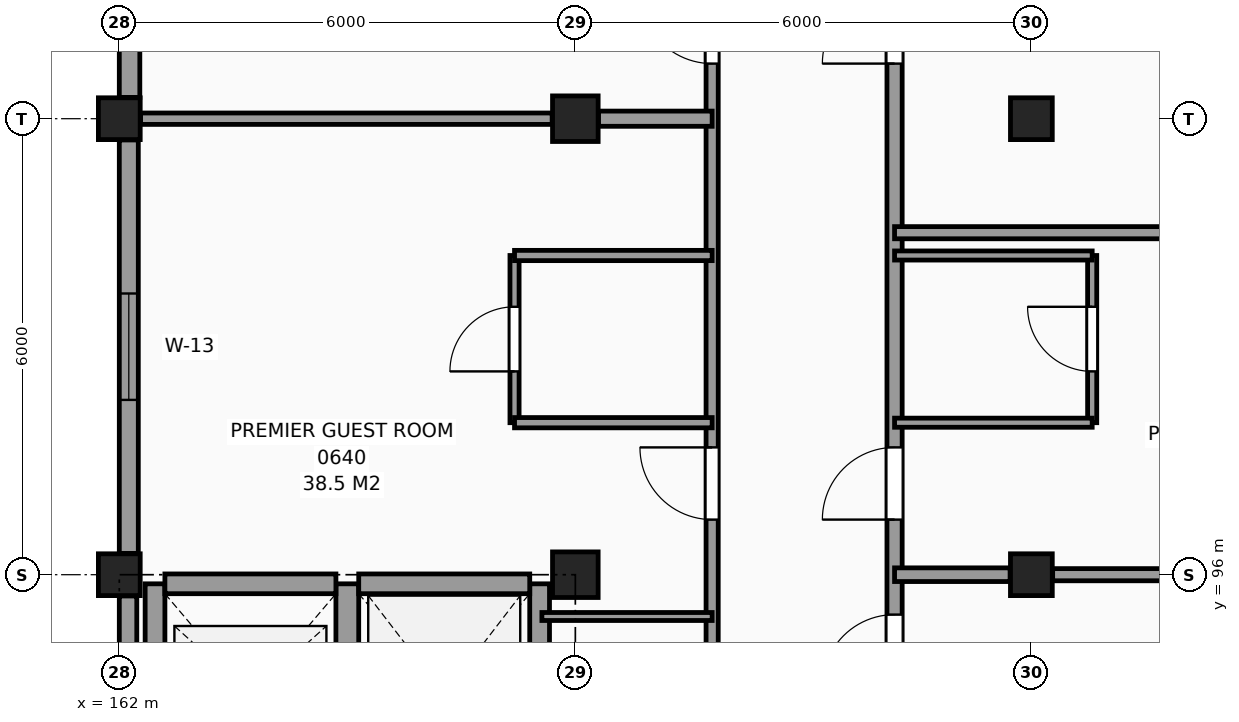
"""IFC4 building model, lengths in metres.
Left out: names, types, materials, properties, quantities, classifications, styles, units other than length and angle.
Written with IfcOpenShell. Run it as: python <this file> out.ifc"""

import sys

from ifc_helpers import new_model, si_unit, direction, frame, frame_2d, origin, origin_2d, place, context, subcontext, project, spatial, rectangle, extrude, element, fill, save


model = new_model("IFC4")
c1 = context("Model", 3, precision=1e-05, world=origin(), true_north=direction((0.0, 1.0)))
c2 = subcontext(c1, "Body", "Model", "MODEL_VIEW")
j1 = project(units=[si_unit("LENGTHUNIT", "METRE"), si_unit("PLANEANGLEUNIT", "RADIAN")], contexts=[c1])
p1 = place(None, origin())
s1 = spatial("IfcSite", under=j1, at=p1, CompositionType="ELEMENT")
p2 = place(p1, origin())
s2 = spatial("IfcBuilding", under=s1, at=p2, CompositionType="ELEMENT")
p3 = place(p2, frame((0.0, 0.0, 28.2)))
s3 = spatial("IfcBuildingStorey", under=s2, at=p3, CompositionType="ELEMENT", Elevation=28.2)
for number, where, z_axis, x_axis in (
    (1, (162.0, 96.0, 0.0), (0.0, 0.0, 1.0), (1.0, 0.0, 0.0)),
    (2, (162.0, 102.0, 0.0), (0.0, 0.0, 1.0), (1.0, 0.0, 0.0)),
):
    element("IfcColumn", number, at=place(p3, frame(where, z_axis=z_axis, x_axis=x_axis)), inside=s3, PredefinedType="COLUMN", context=c2, shape_type="SweptSolid", body=[
        extrude(rectangle(XDim=0.55, YDim=0.55, at=origin_2d()), origin(), (0.0, 0.0, 1.0), 3.3),
    ])
for number, where, z_axis, x_axis in (
    (3, (168.0, 96.0, 0.0), (0.0, 0.0, 1.0), (1.0, 0.0, 0.0)),
    (4, (168.0, 102.0, 0.0), (0.0, 0.0, 1.0), (1.0, 0.0, 0.0)),
):
    element("IfcColumn", number, at=place(p3, frame(where, z_axis=z_axis, x_axis=x_axis)), inside=s3, PredefinedType="COLUMN", context=c2, shape_type="SweptSolid", body=[
        extrude(rectangle(XDim=0.6, YDim=0.6, at=origin_2d()), origin(), (0.0, 0.0, 1.0), 3.3),
    ])
for number, where, z_axis, x_axis in (
    (5, (174.0, 96.0, 0.0), (0.0, 0.0, 1.0), (1.0, 0.0, 0.0)),
    (6, (174.0, 102.0, 0.0), (0.0, 0.0, 1.0), (1.0, 0.0, 0.0)),
):
    element("IfcColumn", number, at=place(p3, frame(where, z_axis=z_axis, x_axis=x_axis)), inside=s3, PredefinedType="COLUMN", context=c2, shape_type="SweptSolid", body=[
        extrude(rectangle(XDim=0.55, YDim=0.55, at=origin_2d()), origin(), (0.0, 0.0, 1.0), 3.3),
    ])
p4 = place(p3, frame((162.135, 107.72, 0.0), z_axis=(0.0, 0.0, 1.0), x_axis=(0.0, -1.0, 0.0)))
e7 = element("IfcWall", 7, at=p4, inside=s3, PredefinedType="SOLIDWALL", context=c2, shape_type="SweptSolid", body=[
    extrude(rectangle(XDim=5.44, YDim=0.27, at=frame_2d((2.72, 0.0))), origin(), (0.0, 0.0, 1.0), 2.43),
])
p5 = place(p4, frame((2.02, 0.0, 0.8)))
e8 = element("IfcOpeningElement", 8, at=p5, cuts=e7, PredefinedType="OPENING", context=c2, shape_type="SweptSolid", body=[
    extrude(rectangle(XDim=1.4, YDim=1.4, at=frame_2d((0.7, 0.7))), frame((0.0, 0.145, 0.0), z_axis=(0.0, -1.0, 0.0), x_axis=(1.0, 0.0, 0.0)), (0.0, 0.0, 1.0), 0.29),
])
p6 = place(p3, frame((162.125, 101.72, 0.0), z_axis=(0.0, 0.0, 1.0), x_axis=(0.0, -1.0, 0.0)))
e9 = element("IfcWall", 9, at=p6, inside=s3, PredefinedType="SOLIDWALL", context=c2, shape_type="SweptSolid", body=[
    extrude(rectangle(XDim=5.44, YDim=0.25, at=frame_2d((2.72, 0.0))), origin(), (0.0, 0.0, 1.0), 2.43),
])
p7 = place(p6, frame((2.02, 0.0, 0.8)))
e10 = element("IfcOpeningElement", 10, at=p7, cuts=e9, PredefinedType="OPENING", context=c2, shape_type="SweptSolid", body=[
    extrude(rectangle(XDim=1.4, YDim=1.4, at=frame_2d((0.7, 0.7))), frame((0.0, 0.135, 0.0), z_axis=(0.0, -1.0, 0.0), x_axis=(1.0, 0.0, 0.0)), (0.0, 0.0, 1.0), 0.27),
])
p8 = place(p3, frame((162.115, 95.72, 0.0), z_axis=(0.0, 0.0, 1.0), x_axis=(0.0, -1.0, 0.0)))
e11 = element("IfcWall", 11, at=p8, inside=s3, PredefinedType="SOLIDWALL", context=c2, shape_type="SweptSolid", body=[
    extrude(rectangle(XDim=5.44, YDim=0.23, at=frame_2d((2.72, 0.0))), origin(), (0.0, 0.0, 1.0), 2.43),
])
p9 = place(p3, frame((162.47, 92.97, 0.0), z_axis=(0.0, 0.0, 1.0), x_axis=(0.0, 1.0, 0.0)))
e12 = element("IfcWall", 12, at=p9, inside=s3, PredefinedType="SHEAR", context=c2, shape_type="SweptSolid", body=[
    extrude(rectangle(XDim=2.91, YDim=0.26, at=frame_2d((1.455, 0.0))), origin(), (0.0, 0.0, 1.0), 3.3),
])
p10 = place(p3, frame((165.0, 92.97, 0.0), z_axis=(0.0, 0.0, 1.0), x_axis=(0.0, 1.0, 0.0)))
e13 = element("IfcWall", 13, at=p10, inside=s3, PredefinedType="SHEAR", context=c2, shape_type="SweptSolid", body=[
    extrude(rectangle(XDim=2.91, YDim=0.3, at=frame_2d((1.455, 0.0))), origin(), (0.0, 0.0, 1.0), 3.3),
])
p11 = place(p3, frame((162.6, 95.88, 0.0), z_axis=(0.0, 0.0, 1.0), x_axis=(1.0, 0.0, 0.0)))
e14 = element("IfcWall", 14, at=p11, inside=s3, PredefinedType="SHEAR", context=c2, shape_type="SweptSolid", body=[
    extrude(rectangle(XDim=2.25, YDim=0.26, at=frame_2d((1.125, 0.0))), origin(), (0.0, 0.0, 1.0), 3.3),
])
p12 = place(p3, frame((167.53, 92.97, 0.0), z_axis=(0.0, 0.0, 1.0), x_axis=(0.0, 1.0, 0.0)))
e15 = element("IfcWall", 15, at=p12, inside=s3, PredefinedType="SHEAR", context=c2, shape_type="SweptSolid", body=[
    extrude(rectangle(XDim=2.91, YDim=0.26, at=frame_2d((1.455, 0.0))), origin(), (0.0, 0.0, 1.0), 3.3),
])
p13 = place(p3, frame((165.15, 95.88, 0.0), z_axis=(0.0, 0.0, 1.0), x_axis=(1.0, 0.0, 0.0)))
e16 = element("IfcWall", 16, at=p13, inside=s3, PredefinedType="SHEAR", context=c2, shape_type="SweptSolid", body=[
    extrude(rectangle(XDim=2.25, YDim=0.26, at=frame_2d((1.125, 0.0))), origin(), (0.0, 0.0, 1.0), 3.3),
])
p14 = place(p3, frame((167.2, 98.0, 0.0), z_axis=(0.0, 0.0, 1.0), x_axis=(0.0, 1.0, 0.0)))
e17 = element("IfcWall", 17, at=p14, inside=s3, PredefinedType="PARTITIONING", context=c2, shape_type="SweptSolid", body=[
    extrude(rectangle(XDim=2.2, YDim=0.12, at=frame_2d((1.1, 0.0))), origin(), (0.0, 0.0, 1.0), 3.08),
])
p15 = place(p14, frame((0.675, 0.0, 0.0)))
e18 = element("IfcOpeningElement", 18, at=p15, cuts=e17, PredefinedType="OPENING", context=c2, shape_type="SweptSolid", body=[
    extrude(rectangle(XDim=0.85, YDim=2.1, at=frame_2d((0.425, 1.05))), frame((0.0, 0.07, 0.0), z_axis=(0.0, -1.0, 0.0), x_axis=(1.0, 0.0, 0.0)), (0.0, 0.0, 1.0), 0.14),
])
p16 = place(p3, frame((169.8, 42.275, 0.0), z_axis=(0.0, 0.0, 1.0), x_axis=(0.0, 1.0, 0.0)))
e19 = element("IfcWall", 19, at=p16, inside=s3, PredefinedType="PARTITIONING", context=c2, shape_type="SweptSolid", body=[
    extrude(rectangle(XDim=65.545, YDim=0.16, at=frame_2d((32.772, 0.0))), origin(), (0.0, 0.0, 1.0), 3.08),
])
p17 = place(p16, frame((50.125, 0.0, 0.0)))
e20 = element("IfcOpeningElement", 20, at=p17, cuts=e19, PredefinedType="OPENING", context=c2, shape_type="SweptSolid", body=[
    extrude(rectangle(XDim=1.2, YDim=2.2, at=frame_2d((0.6, 1.1))), frame((0.0, 0.09, 0.0), z_axis=(0.0, -1.0, 0.0), x_axis=(1.0, 0.0, 0.0)), (0.0, 0.0, 1.0), 0.18),
])
p18 = place(p16, frame((0.4, 0.0, 0.0)))
e21 = element("IfcOpeningElement", 21, at=p18, cuts=e19, PredefinedType="OPENING", context=c2, shape_type="SweptSolid", body=[
    extrude(rectangle(XDim=0.95, YDim=2.1, at=frame_2d((0.475, 1.05))), frame((0.0, 0.09, 0.0), z_axis=(0.0, -1.0, 0.0), x_axis=(1.0, 0.0, 0.0)), (0.0, 0.0, 1.0), 0.18),
])
p19 = place(p16, frame((6.45, 0.0, 0.0)))
e22 = element("IfcOpeningElement", 22, at=p19, cuts=e19, PredefinedType="OPENING", context=c2, shape_type="SweptSolid", body=[
    extrude(rectangle(XDim=0.95, YDim=2.1, at=frame_2d((0.475, 1.05))), frame((0.0, 0.09, 0.0), z_axis=(0.0, -1.0, 0.0), x_axis=(1.0, 0.0, 0.0)), (0.0, 0.0, 1.0), 0.18),
])
p20 = place(p16, frame((12.45, 0.0, 0.0)))
e23 = element("IfcOpeningElement", 23, at=p20, cuts=e19, PredefinedType="OPENING", context=c2, shape_type="SweptSolid", body=[
    extrude(rectangle(XDim=0.95, YDim=2.1, at=frame_2d((0.475, 1.05))), frame((0.0, 0.09, 0.0), z_axis=(0.0, -1.0, 0.0), x_axis=(1.0, 0.0, 0.0)), (0.0, 0.0, 1.0), 0.18),
])
p21 = place(p16, frame((18.45, 0.0, 0.0)))
e24 = element("IfcOpeningElement", 24, at=p21, cuts=e19, PredefinedType="OPENING", context=c2, shape_type="SweptSolid", body=[
    extrude(rectangle(XDim=0.95, YDim=2.1, at=frame_2d((0.475, 1.05))), frame((0.0, 0.09, 0.0), z_axis=(0.0, -1.0, 0.0), x_axis=(1.0, 0.0, 0.0)), (0.0, 0.0, 1.0), 0.18),
])
p22 = place(p16, frame((24.45, 0.0, 0.0)))
e25 = element("IfcOpeningElement", 25, at=p22, cuts=e19, PredefinedType="OPENING", context=c2, shape_type="SweptSolid", body=[
    extrude(rectangle(XDim=0.95, YDim=2.1, at=frame_2d((0.475, 1.05))), frame((0.0, 0.09, 0.0), z_axis=(0.0, -1.0, 0.0), x_axis=(1.0, 0.0, 0.0)), (0.0, 0.0, 1.0), 0.18),
])
p23 = place(p16, frame((30.45, 0.0, 0.0)))
e26 = element("IfcOpeningElement", 26, at=p23, cuts=e19, PredefinedType="OPENING", context=c2, shape_type="SweptSolid", body=[
    extrude(rectangle(XDim=0.95, YDim=2.1, at=frame_2d((0.475, 1.05))), frame((0.0, 0.09, 0.0), z_axis=(0.0, -1.0, 0.0), x_axis=(1.0, 0.0, 0.0)), (0.0, 0.0, 1.0), 0.18),
])
p24 = place(p16, frame((54.45, 0.0, 0.0)))
e27 = element("IfcOpeningElement", 27, at=p24, cuts=e19, PredefinedType="OPENING", context=c2, shape_type="SweptSolid", body=[
    extrude(rectangle(XDim=0.95, YDim=2.1, at=frame_2d((0.475, 1.05))), frame((0.0, 0.09, 0.0), z_axis=(0.0, -1.0, 0.0), x_axis=(1.0, 0.0, 0.0)), (0.0, 0.0, 1.0), 0.18),
])
p25 = place(p16, frame((60.45, 0.0, 0.0)))
e28 = element("IfcOpeningElement", 28, at=p25, cuts=e19, PredefinedType="OPENING", context=c2, shape_type="SweptSolid", body=[
    extrude(rectangle(XDim=0.95, YDim=2.1, at=frame_2d((0.475, 1.05))), frame((0.0, 0.09, 0.0), z_axis=(0.0, -1.0, 0.0), x_axis=(1.0, 0.0, 0.0)), (0.0, 0.0, 1.0), 0.18),
])
p26 = place(p3, frame((172.2, 42.275, 0.0), z_axis=(0.0, 0.0, 1.0), x_axis=(0.0, 1.0, 0.0)))
e29 = element("IfcWall", 29, at=p26, inside=s3, PredefinedType="PARTITIONING", context=c2, shape_type="SweptSolid", body=[
    extrude(rectangle(XDim=65.545, YDim=0.2, at=frame_2d((32.772, 0.0))), origin(), (0.0, 0.0, 1.0), 3.08),
])
p27 = place(p26, frame((0.4, 0.0, 0.0)))
e30 = element("IfcOpeningElement", 30, at=p27, cuts=e29, PredefinedType="OPENING", context=c2, shape_type="SweptSolid", body=[
    extrude(rectangle(XDim=0.95, YDim=2.1, at=frame_2d((0.475, 1.05))), frame((0.0, 0.11, 0.0), z_axis=(0.0, -1.0, 0.0), x_axis=(1.0, 0.0, 0.0)), (0.0, 0.0, 1.0), 0.22),
])
p28 = place(p26, frame((4.85, 0.0, 0.0)))
e31 = element("IfcOpeningElement", 31, at=p28, cuts=e29, PredefinedType="OPENING", context=c2, shape_type="SweptSolid", body=[
    extrude(rectangle(XDim=0.95, YDim=2.1, at=frame_2d((0.475, 1.05))), frame((0.0, 0.11, 0.0), z_axis=(0.0, -1.0, 0.0), x_axis=(1.0, 0.0, 0.0)), (0.0, 0.0, 1.0), 0.22),
])
p29 = place(p26, frame((9.35, 0.0, 0.0)))
e32 = element("IfcOpeningElement", 32, at=p29, cuts=e29, PredefinedType="OPENING", context=c2, shape_type="SweptSolid", body=[
    extrude(rectangle(XDim=0.95, YDim=2.1, at=frame_2d((0.475, 1.05))), frame((0.0, 0.11, 0.0), z_axis=(0.0, -1.0, 0.0), x_axis=(1.0, 0.0, 0.0)), (0.0, 0.0, 1.0), 0.22),
])
p30 = place(p26, frame((18.45, 0.0, 0.0)))
e33 = element("IfcOpeningElement", 33, at=p30, cuts=e29, PredefinedType="OPENING", context=c2, shape_type="SweptSolid", body=[
    extrude(rectangle(XDim=0.95, YDim=2.1, at=frame_2d((0.475, 1.05))), frame((0.0, 0.11, 0.0), z_axis=(0.0, -1.0, 0.0), x_axis=(1.0, 0.0, 0.0)), (0.0, 0.0, 1.0), 0.22),
])
p31 = place(p26, frame((22.85, 0.0, 0.0)))
e34 = element("IfcOpeningElement", 34, at=p31, cuts=e29, PredefinedType="OPENING", context=c2, shape_type="SweptSolid", body=[
    extrude(rectangle(XDim=0.95, YDim=2.1, at=frame_2d((0.475, 1.05))), frame((0.0, 0.11, 0.0), z_axis=(0.0, -1.0, 0.0), x_axis=(1.0, 0.0, 0.0)), (0.0, 0.0, 1.0), 0.22),
])
p32 = place(p26, frame((30.05, 0.0, 0.0)))
e35 = element("IfcOpeningElement", 35, at=p32, cuts=e29, PredefinedType="OPENING", context=c2, shape_type="SweptSolid", body=[
    extrude(rectangle(XDim=0.95, YDim=2.1, at=frame_2d((0.475, 1.05))), frame((0.0, 0.11, 0.0), z_axis=(0.0, -1.0, 0.0), x_axis=(1.0, 0.0, 0.0)), (0.0, 0.0, 1.0), 0.22),
])
p33 = place(p26, frame((38.3, 0.0, 0.0)))
e36 = element("IfcOpeningElement", 36, at=p33, cuts=e29, PredefinedType="OPENING", context=c2, shape_type="SweptSolid", body=[
    extrude(rectangle(XDim=0.95, YDim=2.1, at=frame_2d((0.475, 1.05))), frame((0.0, 0.11, 0.0), z_axis=(0.0, -1.0, 0.0), x_axis=(1.0, 0.0, 0.0)), (0.0, 0.0, 1.0), 0.22),
])
p34 = place(p26, frame((40.85, 0.0, 0.0)))
e37 = element("IfcOpeningElement", 37, at=p34, cuts=e29, PredefinedType="OPENING", context=c2, shape_type="SweptSolid", body=[
    extrude(rectangle(XDim=0.95, YDim=2.1, at=frame_2d((0.475, 1.05))), frame((0.0, 0.11, 0.0), z_axis=(0.0, -1.0, 0.0), x_axis=(1.0, 0.0, 0.0)), (0.0, 0.0, 1.0), 0.22),
])
p35 = place(p26, frame((48.05, 0.0, 0.0)))
e38 = element("IfcOpeningElement", 38, at=p35, cuts=e29, PredefinedType="OPENING", context=c2, shape_type="SweptSolid", body=[
    extrude(rectangle(XDim=0.95, YDim=2.1, at=frame_2d((0.475, 1.05))), frame((0.0, 0.11, 0.0), z_axis=(0.0, -1.0, 0.0), x_axis=(1.0, 0.0, 0.0)), (0.0, 0.0, 1.0), 0.22),
])
p36 = place(p26, frame((52.25, 0.0, 0.0)))
e39 = element("IfcOpeningElement", 39, at=p36, cuts=e29, PredefinedType="OPENING", context=c2, shape_type="SweptSolid", body=[
    extrude(rectangle(XDim=0.95, YDim=2.1, at=frame_2d((0.475, 1.05))), frame((0.0, 0.11, 0.0), z_axis=(0.0, -1.0, 0.0), x_axis=(1.0, 0.0, 0.0)), (0.0, 0.0, 1.0), 0.22),
])
p37 = place(p26, frame((54.45, 0.0, 0.0)))
e40 = element("IfcOpeningElement", 40, at=p37, cuts=e29, PredefinedType="OPENING", context=c2, shape_type="SweptSolid", body=[
    extrude(rectangle(XDim=0.95, YDim=2.1, at=frame_2d((0.475, 1.05))), frame((0.0, 0.11, 0.0), z_axis=(0.0, -1.0, 0.0), x_axis=(1.0, 0.0, 0.0)), (0.0, 0.0, 1.0), 0.22),
])
p38 = place(p26, frame((60.45, 0.0, 0.0)))
e41 = element("IfcOpeningElement", 41, at=p38, cuts=e29, PredefinedType="OPENING", context=c2, shape_type="SweptSolid", body=[
    extrude(rectangle(XDim=0.95, YDim=2.1, at=frame_2d((0.475, 1.05))), frame((0.0, 0.11, 0.0), z_axis=(0.0, -1.0, 0.0), x_axis=(1.0, 0.0, 0.0)), (0.0, 0.0, 1.0), 0.22),
])
p39 = place(p3, frame((174.8, 98.0, 0.0), z_axis=(0.0, 0.0, 1.0), x_axis=(0.0, 1.0, 0.0)))
e42 = element("IfcWall", 42, at=p39, inside=s3, PredefinedType="PARTITIONING", context=c2, shape_type="SweptSolid", body=[
    extrude(rectangle(XDim=2.2, YDim=0.12, at=frame_2d((1.1, 0.0))), origin(), (0.0, 0.0, 1.0), 3.08),
])
p40 = place(p39, frame((0.675, 0.0, 0.0)))
e43 = element("IfcOpeningElement", 43, at=p40, cuts=e42, PredefinedType="OPENING", context=c2, shape_type="SweptSolid", body=[
    extrude(rectangle(XDim=0.85, YDim=2.1, at=frame_2d((0.425, 1.05))), frame((0.0, 0.07, 0.0), z_axis=(0.0, -1.0, 0.0), x_axis=(1.0, 0.0, 0.0)), (0.0, 0.0, 1.0), 0.14),
])
p41 = place(p3, frame((167.56, 95.45, 0.0), z_axis=(0.0, 0.0, 1.0), x_axis=(1.0, 0.0, 0.0)))
e44 = element("IfcWall", 44, at=p41, inside=s3, PredefinedType="PARTITIONING", context=c2, shape_type="SweptSolid", body=[
    extrude(rectangle(XDim=2.24, YDim=0.105, at=frame_2d((1.12, 0.0))), origin(), (0.0, 0.0, 1.0), 3.08),
])
p42 = place(p3, frame((172.2, 96.0, 0.0), z_axis=(0.0, 0.0, 1.0), x_axis=(1.0, 0.0, 0.0)))
e45 = element("IfcWall", 45, at=p42, inside=s3, PredefinedType="PARTITIONING", context=c2, shape_type="SweptSolid", body=[
    extrude(rectangle(XDim=1.52, YDim=0.18, at=frame_2d((0.76, 0.0))), origin(), (0.0, 0.0, 1.0), 2.28),
])
p43 = place(p3, frame((174.28, 96.0, 0.0), z_axis=(0.0, 0.0, 1.0), x_axis=(1.0, 0.0, 0.0)))
e46 = element("IfcWall", 46, at=p43, inside=s3, PredefinedType="PARTITIONING", context=c2, shape_type="SweptSolid", body=[
    extrude(rectangle(XDim=5.415, YDim=0.16, at=frame_2d((2.708, 0.0))), origin(), (0.0, 0.0, 1.0), 2.38),
])
p44 = place(p3, frame((167.2, 98.0, 0.0), z_axis=(0.0, 0.0, 1.0), x_axis=(1.0, 0.0, 0.0)))
e47 = element("IfcWall", 47, at=p44, inside=s3, PredefinedType="PARTITIONING", context=c2, shape_type="SweptSolid", body=[
    extrude(rectangle(XDim=2.6, YDim=0.135, at=frame_2d((1.3, 0.0))), origin(), (0.0, 0.0, 1.0), 3.08),
])
p45 = place(p3, frame((172.2, 98.0, 0.0), z_axis=(0.0, 0.0, 1.0), x_axis=(1.0, 0.0, 0.0)))
e48 = element("IfcWall", 48, at=p45, inside=s3, PredefinedType="PARTITIONING", context=c2, shape_type="SweptSolid", body=[
    extrude(rectangle(XDim=2.6, YDim=0.12, at=frame_2d((1.3, 0.0))), origin(), (0.0, 0.0, 1.0), 3.08),
])
p46 = place(p3, frame((167.2, 100.2, 0.0), z_axis=(0.0, 0.0, 1.0), x_axis=(1.0, 0.0, 0.0)))
e49 = element("IfcWall", 49, at=p46, inside=s3, PredefinedType="PARTITIONING", context=c2, shape_type="SweptSolid", body=[
    extrude(rectangle(XDim=2.6, YDim=0.135, at=frame_2d((1.3, 0.0))), origin(), (0.0, 0.0, 1.0), 3.08),
])
p47 = place(p3, frame((172.2, 100.2, 0.0), z_axis=(0.0, 0.0, 1.0), x_axis=(1.0, 0.0, 0.0)))
e50 = element("IfcWall", 50, at=p47, inside=s3, PredefinedType="PARTITIONING", context=c2, shape_type="SweptSolid", body=[
    extrude(rectangle(XDim=2.6, YDim=0.12, at=frame_2d((1.3, 0.0))), origin(), (0.0, 0.0, 1.0), 3.08),
])
p48 = place(p3, frame((172.2, 100.5, 0.0), z_axis=(0.0, 0.0, 1.0), x_axis=(1.0, 0.0, 0.0)))
e51 = element("IfcWall", 51, at=p48, inside=s3, PredefinedType="PARTITIONING", context=c2, shape_type="SweptSolid", body=[
    extrude(rectangle(XDim=7.545, YDim=0.16, at=frame_2d((3.772, 0.0))), origin(), (0.0, 0.0, 1.0), 3.08),
])
p49 = place(p3, frame((162.28, 102.0, 0.0), z_axis=(0.0, 0.0, 1.0), x_axis=(1.0, 0.0, 0.0)))
e52 = element("IfcWall", 52, at=p49, inside=s3, PredefinedType="PARTITIONING", context=c2, shape_type="SweptSolid", body=[
    extrude(rectangle(XDim=5.415, YDim=0.15, at=frame_2d((2.708, 0.0))), origin(), (0.0, 0.0, 1.0), 2.79),
])
p50 = place(p3, frame((168.305, 102.0, 0.0), z_axis=(0.0, 0.0, 1.0), x_axis=(1.0, 0.0, 0.0)))
e53 = element("IfcWall", 53, at=p50, inside=s3, PredefinedType="PARTITIONING", context=c2, shape_type="SweptSolid", body=[
    extrude(rectangle(XDim=1.495, YDim=0.2, at=frame_2d((0.748, 0.0))), origin(), (0.0, 0.0, 1.0), 2.28),
])
p51 = place(p7, origin())
e54 = element("IfcWindow", 54, at=p51, inside=s3, PartitioningType="SINGLE_PANEL", PredefinedType="WINDOW", context=c2, shape_type="SweptSolid", body=[
    extrude(rectangle(XDim=1.4, YDim=1.4, at=frame_2d((0.7, 0.7))), frame((0.0, 0.03, 0.0), z_axis=(0.0, -1.0, 0.0), x_axis=(1.0, 0.0, 0.0)), (0.0, 0.0, 1.0), 0.06),
])
fill(e10, e54)
p52 = place(p36, origin())
e55 = element("IfcDoor", 55, at=p52, inside=s3, OperationType="SINGLE_SWING_LEFT", PredefinedType="DOOR", context=c2, shape_type="SweptSolid", body=[
    extrude(rectangle(XDim=0.95, YDim=2.1, at=frame_2d((0.475, 1.05))), frame((0.0, 0.025, 0.0), z_axis=(0.0, -1.0, 0.0), x_axis=(1.0, 0.0, 0.0)), (0.0, 0.0, 1.0), 0.05),
])
fill(e39, e55)
p53 = place(p40, origin())
e56 = element("IfcDoor", 56, at=p53, inside=s3, OperationType="SINGLE_SWING_RIGHT", PredefinedType="DOOR", context=c2, shape_type="SweptSolid", body=[
    extrude(rectangle(XDim=0.85, YDim=2.1, at=frame_2d((0.425, 1.05))), frame((0.0, 0.025, 0.0), z_axis=(0.0, -1.0, 0.0), x_axis=(1.0, 0.0, 0.0)), (0.0, 0.0, 1.0), 0.05),
])
fill(e43, e56)
p54 = place(p37, origin())
e57 = element("IfcDoor", 57, at=p54, inside=s3, OperationType="SINGLE_SWING_LEFT", PredefinedType="DOOR", context=c2, shape_type="SweptSolid", body=[
    extrude(rectangle(XDim=0.95, YDim=2.1, at=frame_2d((0.475, 1.05))), frame((0.0, 0.025, 0.0), z_axis=(0.0, -1.0, 0.0), x_axis=(1.0, 0.0, 0.0)), (0.0, 0.0, 1.0), 0.05),
])
fill(e40, e57)
p55 = place(p38, origin())
e58 = element("IfcDoor", 58, at=p55, inside=s3, OperationType="SINGLE_SWING_LEFT", PredefinedType="DOOR", context=c2, shape_type="SweptSolid", body=[
    extrude(rectangle(XDim=0.95, YDim=2.1, at=frame_2d((0.475, 1.05))), frame((0.0, 0.025, 0.0), z_axis=(0.0, -1.0, 0.0), x_axis=(1.0, 0.0, 0.0)), (0.0, 0.0, 1.0), 0.05),
])
fill(e41, e58)
p56 = place(p15, origin())
e59 = element("IfcDoor", 59, at=p56, inside=s3, OperationType="SINGLE_SWING_LEFT", PredefinedType="DOOR", context=c2, shape_type="SweptSolid", body=[
    extrude(rectangle(XDim=0.85, YDim=2.1, at=frame_2d((0.425, 1.05))), frame((0.0, 0.025, 0.0), z_axis=(0.0, -1.0, 0.0), x_axis=(1.0, 0.0, 0.0)), (0.0, 0.0, 1.0), 0.05),
])
fill(e18, e59)
p57 = place(p24, origin())
e60 = element("IfcDoor", 60, at=p57, inside=s3, OperationType="SINGLE_SWING_RIGHT", PredefinedType="DOOR", context=c2, shape_type="SweptSolid", body=[
    extrude(rectangle(XDim=0.95, YDim=2.1, at=frame_2d((0.475, 1.05))), frame((0.0, 0.025, 0.0), z_axis=(0.0, -1.0, 0.0), x_axis=(1.0, 0.0, 0.0)), (0.0, 0.0, 1.0), 0.05),
])
fill(e27, e60)
p58 = place(p25, origin())
e61 = element("IfcDoor", 61, at=p58, inside=s3, OperationType="SINGLE_SWING_RIGHT", PredefinedType="DOOR", context=c2, shape_type="SweptSolid", body=[
    extrude(rectangle(XDim=0.95, YDim=2.1, at=frame_2d((0.475, 1.05))), frame((0.0, 0.025, 0.0), z_axis=(0.0, -1.0, 0.0), x_axis=(1.0, 0.0, 0.0)), (0.0, 0.0, 1.0), 0.05),
])
fill(e28, e61)
save(model, sys.argv[1])
